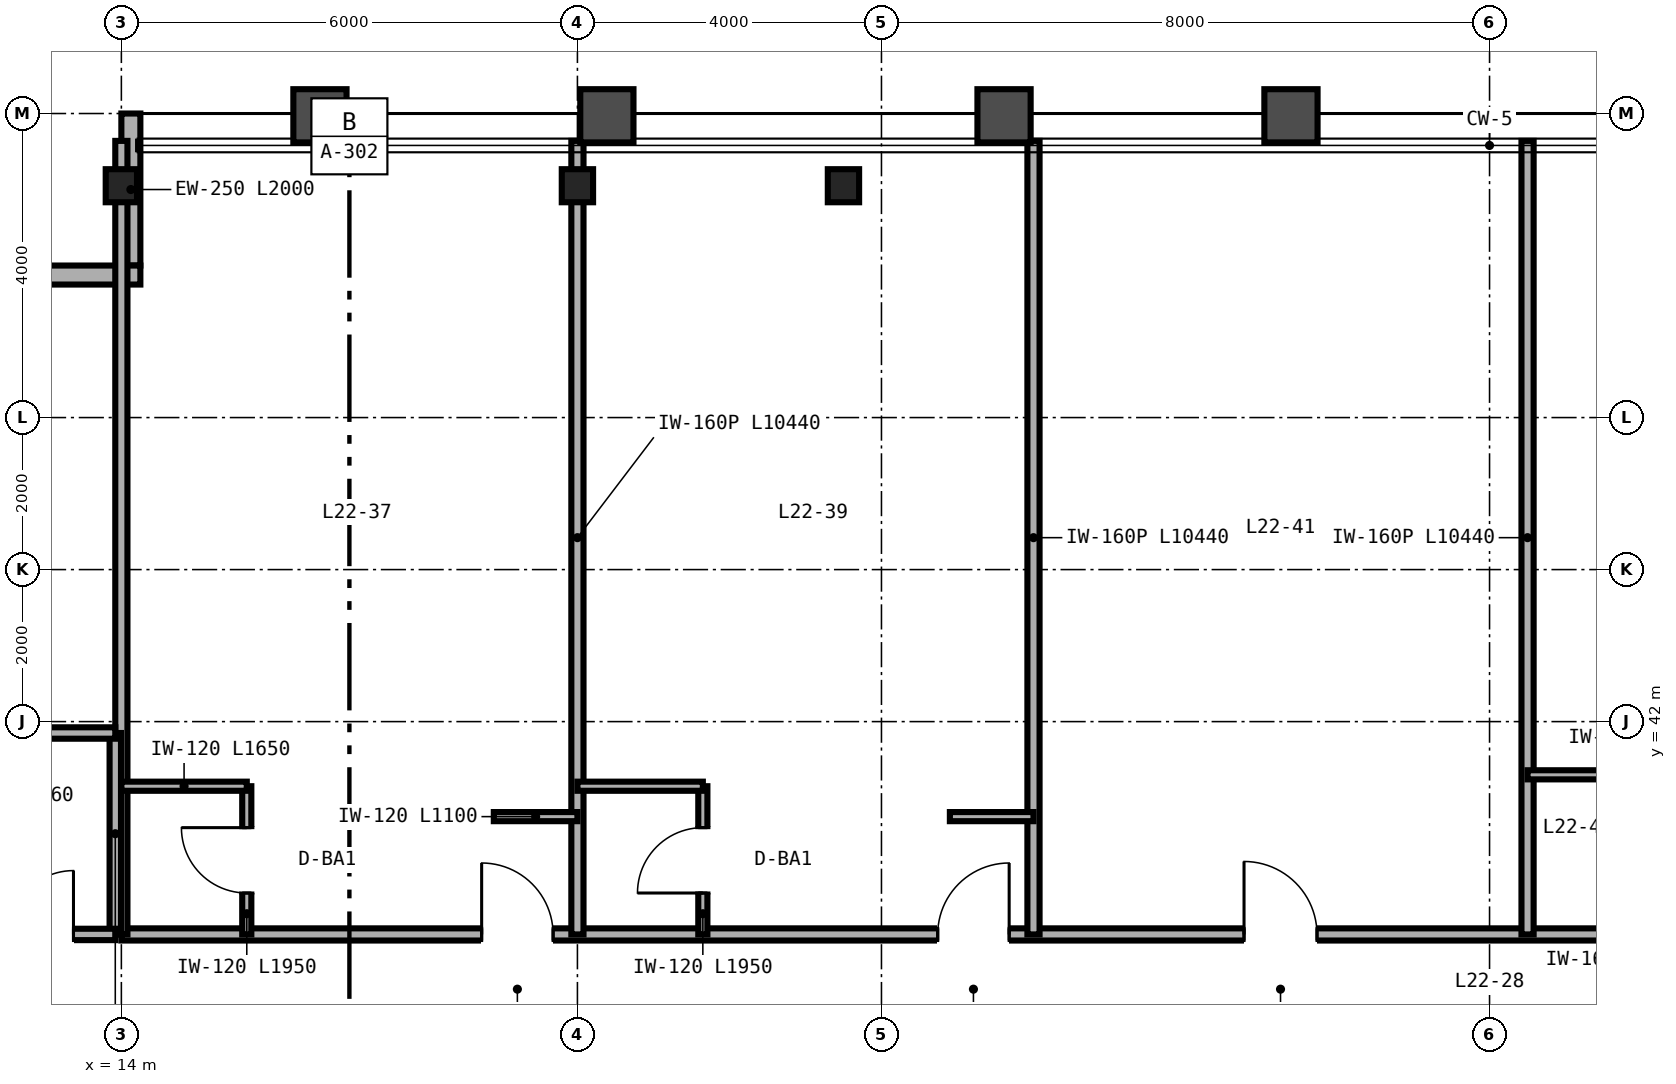
"""IFC4 building model, lengths in metres.
Left out: names, types, materials, properties, quantities, classifications, styles, units other than length and angle.
Written with IfcOpenShell. Run it as: python <this file> out.ifc"""

import sys

from ifc_helpers import new_model, si_unit, direction, frame, frame_2d, origin, origin_2d, place, context, subcontext, project, spatial, rectangle, i_section, extrude, source, transform, mapped, element, fill, save


model = new_model("IFC4")
c1 = context("Model", 3, precision=1e-05, world=origin(), true_north=direction((0.0, 1.0)))
c2 = subcontext(c1, "Body", "Model", "MODEL_VIEW")
j1 = project(units=[si_unit("LENGTHUNIT", "METRE"), si_unit("PLANEANGLEUNIT", "RADIAN")], contexts=[c1])
p1 = place(None, origin())
s1 = spatial("IfcSite", under=j1, at=p1, CompositionType="ELEMENT")
p2 = place(p1, origin())
s2 = spatial("IfcBuilding", under=s1, at=p2, CompositionType="ELEMENT")
p3 = place(p2, frame((0.0, 0.0, 92.4)))
s3 = spatial("IfcBuildingStorey", under=s2, at=p3, CompositionType="ELEMENT", Elevation=92.4)
m1 = source(origin(), c2, "Body", "SweptSolid", [
    extrude(i_section(OverallWidth=0.412, OverallDepth=0.435, WebThickness=0.036, FlangeThickness=0.057, FilletRadius=0.025, at=origin_2d()), origin(), (0.0, 0.0, 1.0), 4.56),
])
for number, where, z_axis, x_axis in (
    (1, (14.0, 49.05, 0.0), (0.0, 0.0, 1.0), (1.0, 0.0, 0.0)),
    (2, (20.0, 49.05, 0.0), (0.0, 0.0, 1.0), (1.0, 0.0, 0.0)),
    (3, (23.5, 49.05, 0.0), (0.0, 0.0, 1.0), (1.0, 0.0, 0.0)),
):
    element("IfcColumn", number, at=place(p3, frame(where, z_axis=z_axis, x_axis=x_axis)), inside=s3, PredefinedType="COLUMN", context=c2, shape_type="MappedRepresentation", body=[
        mapped(m1, transform((0.0, 0.0, 0.0), scale=1.0)),
    ])
p4 = place(p3, frame((14.125, 50.0, 0.0), z_axis=(0.0, 0.0, 1.0), x_axis=(0.0, -1.0, 0.0)))
e4 = element("IfcWall", 4, at=p4, inside=s3, PredefinedType="SOLIDWALL", context=c2, shape_type="SweptSolid", body=[
    extrude(rectangle(XDim=2.0, YDim=0.25, at=frame_2d((1.0, 0.0))), origin(), (0.0, 0.0, 1.0), 3.867),
])
p5 = place(p3, frame((14.25, 47.875, 0.0), z_axis=(0.0, 0.0, 1.0), x_axis=(-1.0, 0.0, 0.0)))
e5 = element("IfcWall", 5, at=p5, inside=s3, PredefinedType="SOLIDWALL", context=c2, shape_type="SweptSolid", body=[
    extrude(rectangle(XDim=2.0, YDim=0.25, at=frame_2d((1.0, 0.0))), origin(), (0.0, 0.0, 1.0), 4.56),
])
p6 = place(p3, frame((14.0, 39.2, 0.0), z_axis=(0.0, 0.0, 1.0), x_axis=(1.0, 0.0, 0.0)))
e6 = element("IfcWall", 6, at=p6, inside=s3, PredefinedType="PARTITIONING", context=c2, shape_type="SweptSolid", body=[
    extrude(rectangle(XDim=36.0, YDim=0.16, at=frame_2d((18.0, 0.0))), origin(), (0.0, 0.0, 1.0), 3.781),
])
p7 = place(p6, frame((4.74, 0.0, 0.0)))
e7 = element("IfcOpeningElement", 7, at=p7, cuts=e6, PredefinedType="OPENING", context=c2, shape_type="SweptSolid", body=[
    extrude(rectangle(XDim=0.94, YDim=2.15, at=frame_2d((0.47, 1.075))), frame((0.0, 0.09, 0.0), z_axis=(0.0, -1.0, 0.0), x_axis=(1.0, 0.0, 0.0)), (0.0, 0.0, 1.0), 0.18),
])
p8 = place(p6, frame((10.74, 0.0, 0.0)))
e8 = element("IfcOpeningElement", 8, at=p8, cuts=e6, PredefinedType="OPENING", context=c2, shape_type="SweptSolid", body=[
    extrude(rectangle(XDim=0.94, YDim=2.15, at=frame_2d((0.47, 1.075))), frame((0.0, 0.09, 0.0), z_axis=(0.0, -1.0, 0.0), x_axis=(1.0, 0.0, 0.0)), (0.0, 0.0, 1.0), 0.18),
])
p9 = place(p6, frame((14.77, 0.0, 0.0)))
e9 = element("IfcOpeningElement", 9, at=p9, cuts=e6, PredefinedType="OPENING", context=c2, shape_type="SweptSolid", body=[
    extrude(rectangle(XDim=0.96, YDim=2.15, at=frame_2d((0.48, 1.075))), frame((0.0, 0.09, 0.0), z_axis=(0.0, -1.0, 0.0), x_axis=(1.0, 0.0, 0.0)), (0.0, 0.0, 1.0), 0.18),
])
p10 = place(p6, frame((23.74, 0.0, 0.0)))
e10 = element("IfcOpeningElement", 10, at=p10, cuts=e6, PredefinedType="OPENING", context=c2, shape_type="SweptSolid", body=[
    extrude(rectangle(XDim=0.94, YDim=2.15, at=frame_2d((0.47, 1.075))), frame((0.0, 0.09, 0.0), z_axis=(0.0, -1.0, 0.0), x_axis=(1.0, 0.0, 0.0)), (0.0, 0.0, 1.0), 0.18),
])
p11 = place(p6, frame((29.24, 0.0, 0.0)))
e11 = element("IfcOpeningElement", 11, at=p11, cuts=e6, PredefinedType="OPENING", context=c2, shape_type="SweptSolid", body=[
    extrude(rectangle(XDim=0.94, YDim=2.15, at=frame_2d((0.47, 1.075))), frame((0.0, 0.09, 0.0), z_axis=(0.0, -1.0, 0.0), x_axis=(1.0, 0.0, 0.0)), (0.0, 0.0, 1.0), 0.18),
])
p12 = place(p6, frame((34.74, 0.0, 0.0)))
e12 = element("IfcOpeningElement", 12, at=p12, cuts=e6, PredefinedType="OPENING", context=c2, shape_type="SweptSolid", body=[
    extrude(rectangle(XDim=0.94, YDim=2.15, at=frame_2d((0.47, 1.075))), frame((0.0, 0.09, 0.0), z_axis=(0.0, -1.0, 0.0), x_axis=(1.0, 0.0, 0.0)), (0.0, 0.0, 1.0), 0.18),
])
for number, where, z_axis, x_axis in (
    (13, (14.0, 39.2, 0.0), (0.0, 0.0, 1.0), (0.0, 1.0, 0.0)),
    (14, (20.0, 39.2, 0.0), (0.0, 0.0, 1.0), (0.0, 1.0, 0.0)),
):
    element("IfcWall", number, at=place(p3, frame(where, z_axis=z_axis, x_axis=x_axis)), inside=s3, PredefinedType="PARTITIONING", context=c2, shape_type="SweptSolid", body=[
        extrude(rectangle(XDim=10.44, YDim=0.16, at=frame_2d((5.22, 0.0))), origin(), (0.0, 0.0, 1.0), 3.867),
    ])
p13 = place(p3, frame((15.65, 39.2, 0.0), z_axis=(0.0, 0.0, 1.0), x_axis=(0.0, 1.0, 0.0)))
e15 = element("IfcWall", 15, at=p13, inside=s3, PredefinedType="PARTITIONING", context=c2, shape_type="SweptSolid", body=[
    extrude(rectangle(XDim=1.95, YDim=0.12, at=frame_2d((0.975, 0.0))), origin(), (0.0, 0.0, 1.0), 4.56),
])
p14 = place(p13, frame((0.545, 0.0, 0.0)))
e16 = element("IfcOpeningElement", 16, at=p14, cuts=e15, PredefinedType="OPENING", context=c2, shape_type="SweptSolid", body=[
    extrude(rectangle(XDim=0.86, YDim=2.1, at=frame_2d((0.43, 1.05))), frame((0.0, 0.07, 0.0), z_axis=(0.0, -1.0, 0.0), x_axis=(1.0, 0.0, 0.0)), (0.0, 0.0, 1.0), 0.14),
])
p15 = place(p3, frame((14.0, 41.15, 0.0), z_axis=(0.0, 0.0, 1.0), x_axis=(1.0, 0.0, 0.0)))
e17 = element("IfcWall", 17, at=p15, inside=s3, PredefinedType="PARTITIONING", context=c2, shape_type="SweptSolid", body=[
    extrude(rectangle(XDim=1.65, YDim=0.12, at=frame_2d((0.825, 0.0))), origin(), (0.0, 0.0, 1.0), 4.56),
])
p16 = place(p3, frame((18.9, 40.75, 0.0), z_axis=(0.0, 0.0, 1.0), x_axis=(1.0, 0.0, 0.0)))
e18 = element("IfcWall", 18, at=p16, inside=s3, PredefinedType="PARTITIONING", context=c2, shape_type="SweptSolid", body=[
    extrude(rectangle(XDim=1.1, YDim=0.12, at=frame_2d((0.55, 0.0))), origin(), (0.0, 0.0, 1.0), 4.56),
])
p17 = place(p3, frame((26.0, 39.2, 0.0), z_axis=(0.0, 0.0, 1.0), x_axis=(0.0, 1.0, 0.0)))
e19 = element("IfcWall", 19, at=p17, inside=s3, PredefinedType="PARTITIONING", context=c2, shape_type="SweptSolid", body=[
    extrude(rectangle(XDim=10.44, YDim=0.16, at=frame_2d((5.22, 0.0))), origin(), (0.0, 0.0, 1.0), 3.633),
])
p18 = place(p3, frame((21.65, 39.2, 0.0), z_axis=(0.0, 0.0, 1.0), x_axis=(0.0, 1.0, 0.0)))
e20 = element("IfcWall", 20, at=p18, inside=s3, PredefinedType="PARTITIONING", context=c2, shape_type="SweptSolid", body=[
    extrude(rectangle(XDim=1.95, YDim=0.12, at=frame_2d((0.975, 0.0))), origin(), (0.0, 0.0, 1.0), 4.56),
])
p19 = place(p18, frame((0.545, 0.0, 0.0)))
e21 = element("IfcOpeningElement", 21, at=p19, cuts=e20, PredefinedType="OPENING", context=c2, shape_type="SweptSolid", body=[
    extrude(rectangle(XDim=0.86, YDim=2.1, at=frame_2d((0.43, 1.05))), frame((0.0, 0.07, 0.0), z_axis=(0.0, -1.0, 0.0), x_axis=(1.0, 0.0, 0.0)), (0.0, 0.0, 1.0), 0.14),
])
p20 = place(p3, frame((20.0, 41.15, 0.0), z_axis=(0.0, 0.0, 1.0), x_axis=(1.0, 0.0, 0.0)))
e22 = element("IfcWall", 22, at=p20, inside=s3, PredefinedType="PARTITIONING", context=c2, shape_type="SweptSolid", body=[
    extrude(rectangle(XDim=1.65, YDim=0.12, at=frame_2d((0.825, 0.0))), origin(), (0.0, 0.0, 1.0), 4.56),
])
p21 = place(p3, frame((24.9, 40.75, 0.0), z_axis=(0.0, 0.0, 1.0), x_axis=(1.0, 0.0, 0.0)))
e23 = element("IfcWall", 23, at=p21, inside=s3, PredefinedType="PARTITIONING", context=c2, shape_type="SweptSolid", body=[
    extrude(rectangle(XDim=1.1, YDim=0.12, at=frame_2d((0.55, 0.0))), origin(), (0.0, 0.0, 1.0), 4.56),
])
p22 = place(p3, frame((32.5, 39.2, 0.0), z_axis=(0.0, 0.0, 1.0), x_axis=(0.0, 1.0, 0.0)))
e24 = element("IfcWall", 24, at=p22, inside=s3, PredefinedType="PARTITIONING", context=c2, shape_type="SweptSolid", body=[
    extrude(rectangle(XDim=10.44, YDim=0.16, at=frame_2d((5.22, 0.0))), origin(), (0.0, 0.0, 1.0), 3.633),
])
p23 = place(p3, frame((32.5, 41.3, 0.0), z_axis=(0.0, 0.0, 1.0), x_axis=(1.0, 0.0, 0.0)))
e25 = element("IfcWall", 25, at=p23, inside=s3, PredefinedType="PARTITIONING", context=c2, shape_type="SweptSolid", body=[
    extrude(rectangle(XDim=1.95, YDim=0.12, at=frame_2d((0.975, 0.0))), origin(), (0.0, 0.0, 1.0), 4.56),
])
p24 = place(p3, frame((13.92, 39.2, 0.0), z_axis=(0.0, 0.0, 1.0), x_axis=(0.0, 1.0, 0.0)))
e26 = element("IfcWall", 26, at=p24, inside=s3, PredefinedType="PARTITIONING", context=c2, shape_type="SweptSolid", body=[
    extrude(rectangle(XDim=2.65, YDim=0.15, at=frame_2d((1.325, 0.0))), origin(), (0.0, 0.0, 1.0), 4.56),
])
p25 = place(p3, frame((10.18, 41.85, 0.0), z_axis=(0.0, 0.0, 1.0), x_axis=(1.0, 0.0, 0.0)))
e27 = element("IfcWall", 27, at=p25, inside=s3, PredefinedType="PARTITIONING", context=c2, shape_type="SweptSolid", body=[
    extrude(rectangle(XDim=3.74, YDim=0.15, at=frame_2d((1.87, 0.0))), origin(), (0.0, 0.0, 1.0), 4.56),
])
p26 = place(p3, frame((10.18, 39.2, 0.0), z_axis=(0.0, 0.0, 1.0), x_axis=(1.0, 0.0, 0.0)))
e28 = element("IfcWall", 28, at=p26, inside=s3, PredefinedType="PARTITIONING", context=c2, shape_type="SweptSolid", body=[
    extrude(rectangle(XDim=3.74, YDim=0.15, at=frame_2d((1.87, 0.0))), origin(), (0.0, 0.0, 1.0), 4.56),
])
p27 = place(p26, frame((0.45, 0.0, 0.0)))
e29 = element("IfcOpeningElement", 29, at=p27, cuts=e28, PredefinedType="OPENING", context=c2, shape_type="SweptSolid", body=[
    extrude(rectangle(XDim=0.84, YDim=2.1, at=frame_2d((0.42, 1.05))), frame((0.0, 0.085, 0.0), z_axis=(0.0, -1.0, 0.0), x_axis=(1.0, 0.0, 0.0)), (0.0, 0.0, 1.0), 0.17),
])
p28 = place(p26, frame((2.35, 0.0, 0.0)))
e30 = element("IfcOpeningElement", 30, at=p28, cuts=e28, PredefinedType="OPENING", context=c2, shape_type="SweptSolid", body=[
    extrude(rectangle(XDim=0.84, YDim=2.1, at=frame_2d((0.42, 1.05))), frame((0.0, 0.085, 0.0), z_axis=(0.0, -1.0, 0.0), x_axis=(1.0, 0.0, 0.0)), (0.0, 0.0, 1.0), 0.17),
])
m2 = source(origin(), c2, "Body", "SweptSolid", [
    extrude(rectangle(XDim=0.86, YDim=2.1, at=frame_2d((0.43, 1.05))), frame((0.0, 0.025, 0.0), z_axis=(0.0, -1.0, 0.0), x_axis=(1.0, 0.0, 0.0)), (0.0, 0.0, 1.0), 0.05),
])
p29 = place(p14, origin())
e31 = element("IfcDoor", 31, at=p29, inside=s3, OperationType="SINGLE_SWING_RIGHT", PredefinedType="DOOR", context=c2, shape_type="MappedRepresentation", body=[
    mapped(m2, transform((0.0, 0.0, 0.0), scale=1.0)),
])
fill(e16, e31)
p30 = place(p19, origin())
e32 = element("IfcDoor", 32, at=p30, inside=s3, OperationType="SINGLE_SWING_LEFT", PredefinedType="DOOR", context=c2, shape_type="MappedRepresentation", body=[
    mapped(m2, transform((0.0, 0.0, 0.0), scale=1.0)),
])
fill(e21, e32)
m3 = source(origin(), c2, "Body", "SweptSolid", [
    extrude(rectangle(XDim=0.94, YDim=2.15, at=frame_2d((0.47, 1.075))), frame((0.0, 0.025, 0.0), z_axis=(0.0, -1.0, 0.0), x_axis=(1.0, 0.0, 0.0)), (0.0, 0.0, 1.0), 0.05),
])
p31 = place(p7, origin())
e33 = element("IfcDoor", 33, at=p31, inside=s3, OperationType="SINGLE_SWING_LEFT", PredefinedType="DOOR", context=c2, shape_type="MappedRepresentation", body=[
    mapped(m3, transform((0.0, 0.0, 0.0), scale=1.0)),
])
fill(e7, e33)
p32 = place(p8, origin())
e34 = element("IfcDoor", 34, at=p32, inside=s3, OperationType="SINGLE_SWING_RIGHT", PredefinedType="DOOR", context=c2, shape_type="MappedRepresentation", body=[
    mapped(m3, transform((0.0, 0.0, 0.0), scale=1.0)),
])
fill(e8, e34)
m4 = source(origin(), c2, "Body", "SweptSolid", [
    extrude(rectangle(XDim=0.96, YDim=2.15, at=frame_2d((0.48, 1.075))), frame((0.0, 0.025, 0.0), z_axis=(0.0, -1.0, 0.0), x_axis=(1.0, 0.0, 0.0)), (0.0, 0.0, 1.0), 0.05),
])
p33 = place(p9, origin())
e35 = element("IfcDoor", 35, at=p33, inside=s3, OperationType="SINGLE_SWING_LEFT", PredefinedType="DOOR", context=c2, shape_type="MappedRepresentation", body=[
    mapped(m4, transform((0.0, 0.0, 0.0), scale=1.0)),
])
fill(e9, e35)
m5 = source(origin(), c2, "Body", "SweptSolid", [
    extrude(rectangle(XDim=0.84, YDim=2.1, at=frame_2d((0.42, 1.05))), frame((0.0, 0.025, 0.0), z_axis=(0.0, -1.0, 0.0), x_axis=(1.0, 0.0, 0.0)), (0.0, 0.0, 1.0), 0.05),
])
p34 = place(p28, origin())
e36 = element("IfcDoor", 36, at=p34, inside=s3, OperationType="SINGLE_SWING_RIGHT", PredefinedType="DOOR", context=c2, shape_type="MappedRepresentation", body=[
    mapped(m5, transform((0.0, 0.0, 0.0), scale=1.0)),
])
fill(e30, e36)
save(model, sys.argv[1])
